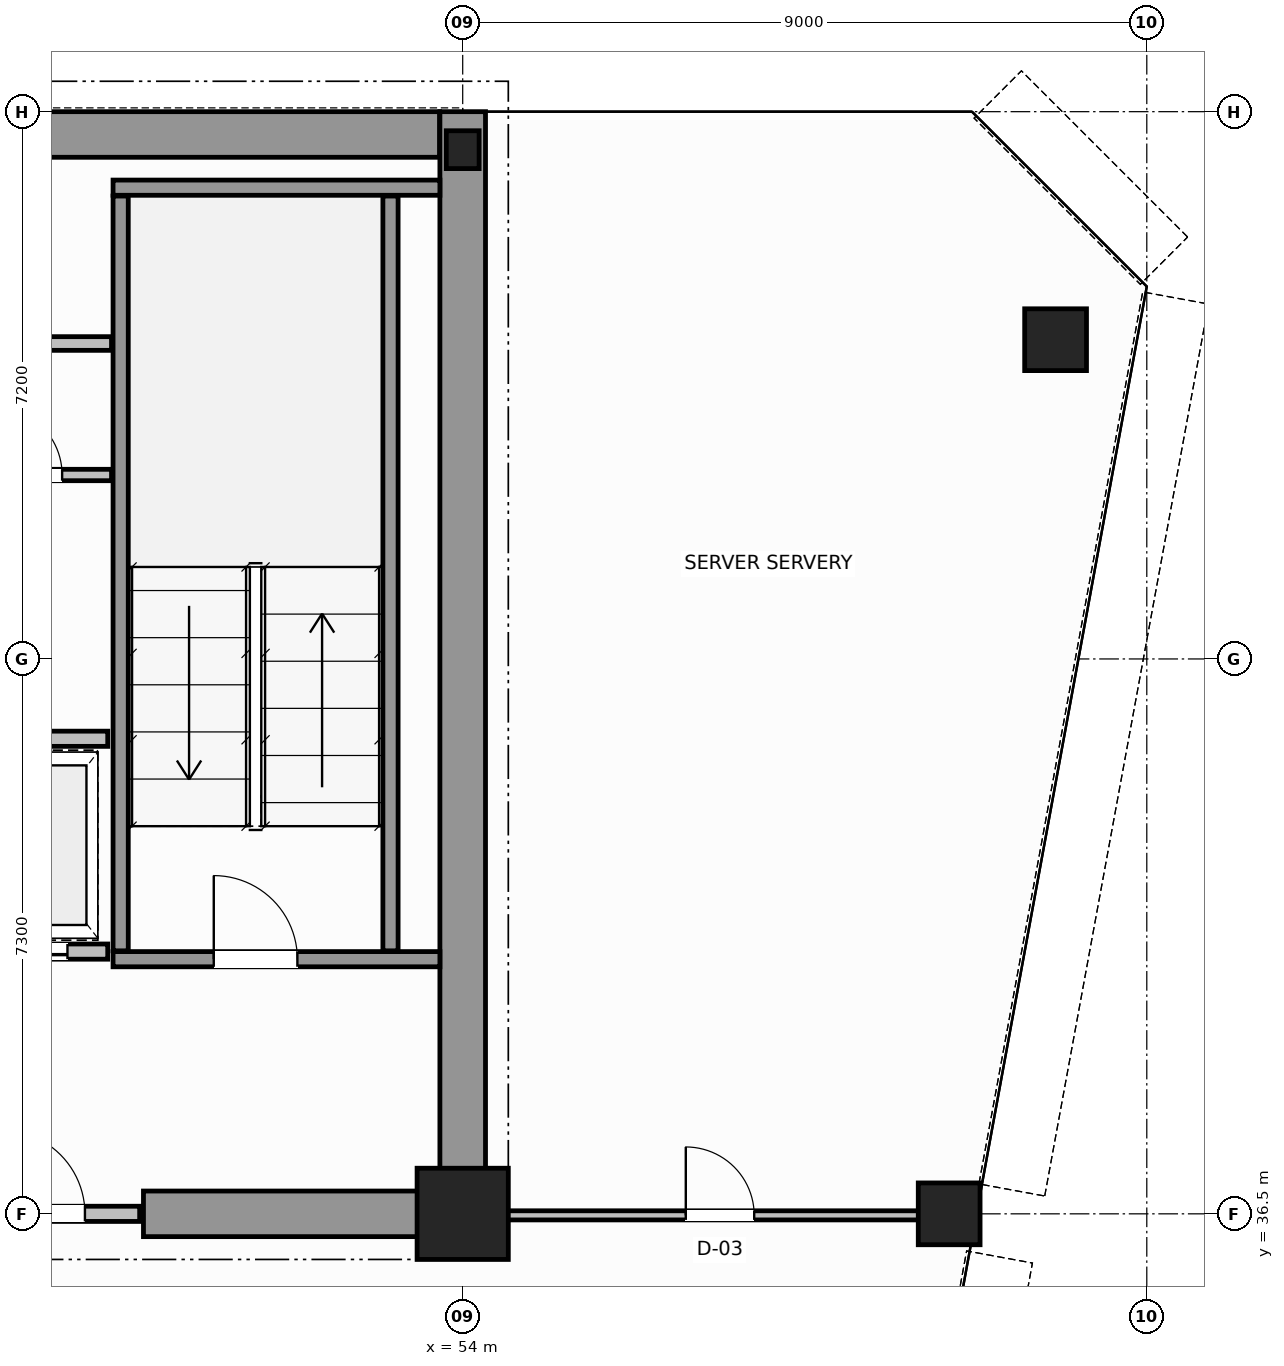
"""IFC4 building model, lengths in metres.
Left out: names, types, materials, properties, quantities, classifications, styles, units other than length and angle.
Written with IfcOpenShell. Run it as: python <this file> out.ifc"""

import sys

from ifc_helpers import new_model, si_unit, direction, frame, frame_2d, origin, origin_2d, place, context, subcontext, project, spatial, rectangle, hollow_circle, i_section, extrude, source, transform, mapped, element, fill, save


model = new_model("IFC4")
c1 = context("Model", 3, precision=1e-05, world=origin(), true_north=direction((0.0, 1.0)))
c2 = subcontext(c1, "Body", "Model", "MODEL_VIEW")
j1 = project(units=[si_unit("LENGTHUNIT", "METRE"), si_unit("PLANEANGLEUNIT", "RADIAN")], contexts=[c1])
p1 = place(None, origin())
s1 = spatial("IfcSite", under=j1, at=p1, CompositionType="ELEMENT")
p2 = place(p1, origin())
s2 = spatial("IfcBuilding", under=s1, at=p2, CompositionType="ELEMENT")
p3 = place(p2, frame((0.0, 0.0, 184.2)))
s3 = spatial("IfcBuildingStorey", under=s2, at=p3, CompositionType="ELEMENT", Elevation=184.2)
m1 = source(origin(), c2, "Body", "SweptSolid", [
    extrude(rectangle(XDim=1.2, YDim=1.2, at=origin_2d()), origin(), (0.0, 0.0, 1.0), 3.8),
])
p4 = place(p3, frame((54.0, 36.5, 0.0), z_axis=(0.0, 0.0, 1.0), x_axis=(1.0, 0.0, 0.0)))
e1 = element("IfcColumn", 1, at=p4, inside=s3, PredefinedType="COLUMN", context=c2, shape_type="MappedRepresentation", body=[
    mapped(m1, transform((0.0, 0.0, 0.0), scale=1.0)),
])
m2 = source(origin(), c2, "Body", "SweptSolid", [
    extrude(i_section(OverallWidth=0.432, OverallDepth=0.498, WebThickness=0.055, FlangeThickness=0.068, FilletRadius=0.015, at=origin_2d()), origin(), (0.0, 0.0, 1.0), 3.8),
])
p5 = place(p3, frame((54.0, 50.5, 0.0), z_axis=(0.0, 0.0, 1.0), x_axis=(1.0, 0.0, 0.0)))
e2 = element("IfcColumn", 2, at=p5, inside=s3, PredefinedType="COLUMN", context=c2, shape_type="MappedRepresentation", body=[
    mapped(m2, transform((0.0, 0.0, 0.0), scale=1.0)),
])
m3 = source(origin(), c2, "Body", "SweptSolid", [
    extrude(hollow_circle(Radius=0.406, WallThickness=0.04, at=origin_2d()), origin(), (0.0, 0.0, 1.0), 3.8),
])
for number, where, z_axis, x_axis in (
    (3, (61.8, 48.0, 0.0), (0.0, 0.0, 1.0), (1.0, 0.0, 0.0)),
    (4, (60.4, 36.5, 0.0), (0.0, 0.0, 1.0), (1.0, 0.0, 0.0)),
):
    element("IfcColumn", number, at=place(p3, frame(where, z_axis=z_axis, x_axis=x_axis)), inside=s3, PredefinedType="COLUMN", context=c2, shape_type="MappedRepresentation", body=[
        mapped(m3, transform((0.0, 0.0, 0.0), scale=1.0)),
    ])
p6 = place(p3, frame((34.002, 50.7, 0.0), z_axis=(0.0, 0.0, 1.0), x_axis=(1.0, 0.0, 0.0)))
e5 = element("IfcWall", 5, at=p6, inside=s3, PredefinedType="SHEAR", context=c2, shape_type="SweptSolid", body=[
    extrude(rectangle(XDim=19.694, YDim=0.6, at=frame_2d((9.847, 0.0))), origin(), (0.0, 0.0, 1.0), 3.8),
])
p7 = place(p3, frame((54.0, 36.5, 0.0), z_axis=(0.0, 0.0, 1.0), x_axis=(0.0, 1.0, 0.0)))
e6 = element("IfcWall", 6, at=p7, inside=s3, PredefinedType="SHEAR", context=c2, shape_type="SweptSolid", body=[
    extrude(rectangle(XDim=14.5, YDim=0.6, at=frame_2d((7.25, 0.0))), origin(), (0.0, 0.0, 1.0), 3.8),
])
p8 = place(p3, frame((49.8, 36.5, 0.0), z_axis=(0.0, 0.0, 1.0), x_axis=(1.0, 0.0, 0.0)))
e7 = element("IfcWall", 7, at=p8, inside=s3, PredefinedType="SHEAR", context=c2, shape_type="SweptSolid", body=[
    extrude(rectangle(XDim=3.88, YDim=0.6, at=frame_2d((1.94, 0.0))), origin(), (0.0, 0.0, 1.0), 2.58),
])
p9 = place(p3, frame((49.4, 39.85, 0.0), z_axis=(0.0, 0.0, 1.0), x_axis=(1.0, 0.0, 0.0)))
e8 = element("IfcWall", 8, at=p9, inside=s3, PredefinedType="SOLIDWALL", context=c2, shape_type="SweptSolid", body=[
    extrude(rectangle(XDim=4.3, YDim=0.2, at=frame_2d((2.15, 0.0))), origin(), (0.0, 0.0, 1.0), 3.8),
])
p10 = place(p9, frame((1.325, 0.0, 0.0)))
e9 = element("IfcOpeningElement", 9, at=p10, cuts=e8, PredefinedType="OPENING", context=c2, shape_type="SweptSolid", body=[
    extrude(rectangle(XDim=1.1, YDim=2.15, at=frame_2d((0.55, 1.075))), frame((0.0, 0.11, 0.0), z_axis=(0.0, -1.0, 0.0), x_axis=(1.0, 0.0, 0.0)), (0.0, 0.0, 1.0), 0.22),
])
p11 = place(p3, frame((49.4, 50.0, 0.0), z_axis=(0.0, 0.0, 1.0), x_axis=(1.0, 0.0, 0.0)))
e10 = element("IfcWall", 10, at=p11, inside=s3, PredefinedType="SOLIDWALL", context=c2, shape_type="SweptSolid", body=[
    extrude(rectangle(XDim=4.3, YDim=0.2, at=frame_2d((2.15, 0.0))), origin(), (0.0, 0.0, 1.0), 3.8),
])
for number, where, z_axis, x_axis in (
    (11, (49.5, 39.96, 0.0), (0.0, 0.0, 1.0), (0.0, 1.0, 0.0)),
    (12, (53.05, 39.96, 0.0), (0.0, 0.0, 1.0), (0.0, 1.0, 0.0)),
):
    element("IfcWall", number, at=place(p3, frame(where, z_axis=z_axis, x_axis=x_axis)), inside=s3, PredefinedType="SOLIDWALL", context=c2, shape_type="SweptSolid", body=[
        extrude(rectangle(XDim=9.93, YDim=0.2, at=frame_2d((4.965, 0.0))), origin(), (0.0, 0.0, 1.0), 3.8),
    ])
p12 = place(p3, frame((47.28, 36.5, 0.0), z_axis=(0.0, 0.0, 1.0), x_axis=(1.0, 0.0, 0.0)))
e13 = element("IfcWall", 13, at=p12, inside=s3, PredefinedType="SOLIDWALL", context=c2, shape_type="SweptSolid", body=[
    extrude(rectangle(XDim=2.47, YDim=0.2, at=frame_2d((1.235, 0.0))), origin(), (0.0, 0.0, 1.0), 2.57),
])
p13 = place(p12, frame((0.65, 0.0, 0.0)))
e14 = element("IfcOpeningElement", 14, at=p13, cuts=e13, PredefinedType="OPENING", context=c2, shape_type="SweptSolid", body=[
    extrude(rectangle(XDim=1.1, YDim=2.15, at=frame_2d((0.55, 1.075))), frame((0.0, 0.11, 0.0), z_axis=(0.0, -1.0, 0.0), x_axis=(1.0, 0.0, 0.0)), (0.0, 0.0, 1.0), 0.22),
])
p14 = place(p3, frame((47.17, 39.95, 0.0), z_axis=(0.0, 0.0, 1.0), x_axis=(1.0, 0.0, 0.0)))
e15 = element("IfcWall", 15, at=p14, inside=s3, PredefinedType="SOLIDWALL", context=c2, shape_type="SweptSolid", body=[
    extrude(rectangle(XDim=2.16, YDim=0.2, at=frame_2d((1.08, 0.0))), origin(), (0.0, 0.0, 1.0), 3.58),
])
p15 = place(p14, frame((0.53, 0.0, 0.0)))
e16 = element("IfcOpeningElement", 16, at=p15, cuts=e15, PredefinedType="OPENING", context=c2, shape_type="SweptSolid", body=[
    extrude(rectangle(XDim=1.1, YDim=2.15, at=frame_2d((0.55, 1.075))), frame((0.0, 0.11, 0.0), z_axis=(0.0, -1.0, 0.0), x_axis=(1.0, 0.0, 0.0)), (0.0, 0.0, 1.0), 0.22),
])
p16 = place(p3, frame((47.17, 42.75, 0.0), z_axis=(0.0, 0.0, 1.0), x_axis=(1.0, 0.0, 0.0)))
e17 = element("IfcWall", 17, at=p16, inside=s3, PredefinedType="SOLIDWALL", context=c2, shape_type="SweptSolid", body=[
    extrude(rectangle(XDim=2.16, YDim=0.2, at=frame_2d((1.08, 0.0))), origin(), (0.0, 0.0, 1.0), 3.58),
])
p17 = place(p3, frame((47.28, 46.22, 0.0), z_axis=(0.0, 0.0, 1.0), x_axis=(1.0, 0.0, 0.0)))
e18 = element("IfcWall", 18, at=p17, inside=s3, PredefinedType="PARTITIONING", context=c2, shape_type="SweptSolid", body=[
    extrude(rectangle(XDim=2.1, YDim=0.15, at=frame_2d((1.05, 0.0))), origin(), (0.0, 0.0, 1.0), 3.58),
])
p18 = place(p17, frame((0.55, 0.0, 0.0)))
e19 = element("IfcOpeningElement", 19, at=p18, cuts=e18, PredefinedType="OPENING", context=c2, shape_type="SweptSolid", body=[
    extrude(rectangle(XDim=0.9, YDim=2.1, at=frame_2d((0.45, 1.05))), frame((0.0, 0.085, 0.0), z_axis=(0.0, -1.0, 0.0), x_axis=(1.0, 0.0, 0.0)), (0.0, 0.0, 1.0), 0.17),
])
p19 = place(p3, frame((43.3, 47.95, 0.0), z_axis=(0.0, 0.0, 1.0), x_axis=(1.0, 0.0, 0.0)))
e20 = element("IfcWall", 20, at=p19, inside=s3, PredefinedType="PLUMBINGWALL", context=c2, shape_type="SweptSolid", body=[
    extrude(rectangle(XDim=6.08, YDim=0.18, at=frame_2d((3.04, 0.0))), origin(), (0.0, 0.0, 1.0), 3.58),
])
p20 = place(p19, frame((2.4, 0.0, 0.0)))
e21 = element("IfcOpeningElement", 21, at=p20, cuts=e20, PredefinedType="OPENING", context=c2, shape_type="SweptSolid", body=[
    extrude(rectangle(XDim=0.9, YDim=2.15, at=frame_2d((0.45, 1.075))), frame((0.0, 0.1, 0.0), z_axis=(0.0, -1.0, 0.0), x_axis=(1.0, 0.0, 0.0)), (0.0, 0.0, 1.0), 0.2),
])
p21 = place(p3, frame((54.06, 36.48, 0.0), z_axis=(0.0, 0.0, 1.0), x_axis=(1.0, 0.0, 0.0)))
e22 = element("IfcWall", 22, at=p21, inside=s3, PredefinedType="PARTITIONING", context=c2, shape_type="SweptSolid", body=[
    extrude(rectangle(XDim=6.651, YDim=0.12, at=frame_2d((3.325, 0.0))), origin(), (0.0, 0.0, 1.0), 2.97),
])
p22 = place(p21, frame((2.875, 0.0, 0.0)))
e23 = element("IfcOpeningElement", 23, at=p22, cuts=e22, PredefinedType="OPENING", context=c2, shape_type="SweptSolid", body=[
    extrude(rectangle(XDim=0.9, YDim=2.15, at=frame_2d((0.45, 1.075))), frame((0.0, 0.07, 0.0), z_axis=(0.0, -1.0, 0.0), x_axis=(1.0, 0.0, 0.0)), (0.0, 0.0, 1.0), 0.14),
])
m4 = source(origin(), c2, "Body", "SweptSolid", [
    extrude(rectangle(XDim=1.1, YDim=2.15, at=frame_2d((0.55, 1.075))), frame((0.0, 0.025, 0.0), z_axis=(0.0, -1.0, 0.0), x_axis=(1.0, 0.0, 0.0)), (0.0, 0.0, 1.0), 0.05),
])
p23 = place(p10, origin())
e24 = element("IfcDoor", 24, at=p23, inside=s3, OperationType="SINGLE_SWING_RIGHT", PredefinedType="DOOR", context=c2, shape_type="MappedRepresentation", body=[
    mapped(m4, transform((0.0, 0.0, 0.0), scale=1.0)),
])
fill(e9, e24)
p24 = place(p13, origin())
e25 = element("IfcDoor", 25, at=p24, inside=s3, OperationType="SINGLE_SWING_LEFT", PredefinedType="DOOR", context=c2, shape_type="MappedRepresentation", body=[
    mapped(m4, transform((0.0, 0.0, 0.0), scale=1.0)),
])
fill(e14, e25)
p25 = place(p15, origin())
e26 = element("IfcDoor", 26, at=p25, inside=s3, OperationType="DOUBLE_DOOR_SLIDING", PredefinedType="DOOR", context=c2, shape_type="MappedRepresentation", body=[
    mapped(m4, transform((0.0, 0.0, 0.0), scale=1.0)),
])
fill(e16, e26)
m5 = source(origin(), c2, "Body", "SweptSolid", [
    extrude(rectangle(XDim=0.9, YDim=2.1, at=frame_2d((0.45, 1.05))), frame((0.0, 0.025, 0.0), z_axis=(0.0, -1.0, 0.0), x_axis=(1.0, 0.0, 0.0)), (0.0, 0.0, 1.0), 0.05),
])
p26 = place(p18, origin())
e27 = element("IfcDoor", 27, at=p26, inside=s3, OperationType="SINGLE_SWING_RIGHT", PredefinedType="DOOR", context=c2, shape_type="MappedRepresentation", body=[
    mapped(m5, transform((0.0, 0.0, 0.0), scale=1.0)),
])
fill(e19, e27)
m6 = source(origin(), c2, "Body", "SweptSolid", [
    extrude(rectangle(XDim=0.9, YDim=2.15, at=frame_2d((0.45, 1.075))), frame((0.0, 0.025, 0.0), z_axis=(0.0, -1.0, 0.0), x_axis=(1.0, 0.0, 0.0)), (0.0, 0.0, 1.0), 0.05),
])
p27 = place(p22, origin())
e28 = element("IfcDoor", 28, at=p27, inside=s3, OperationType="SINGLE_SWING_RIGHT", PredefinedType="DOOR", context=c2, shape_type="MappedRepresentation", body=[
    mapped(m6, transform((0.0, 0.0, 0.0), scale=1.0)),
])
fill(e23, e28)
save(model, sys.argv[1])
